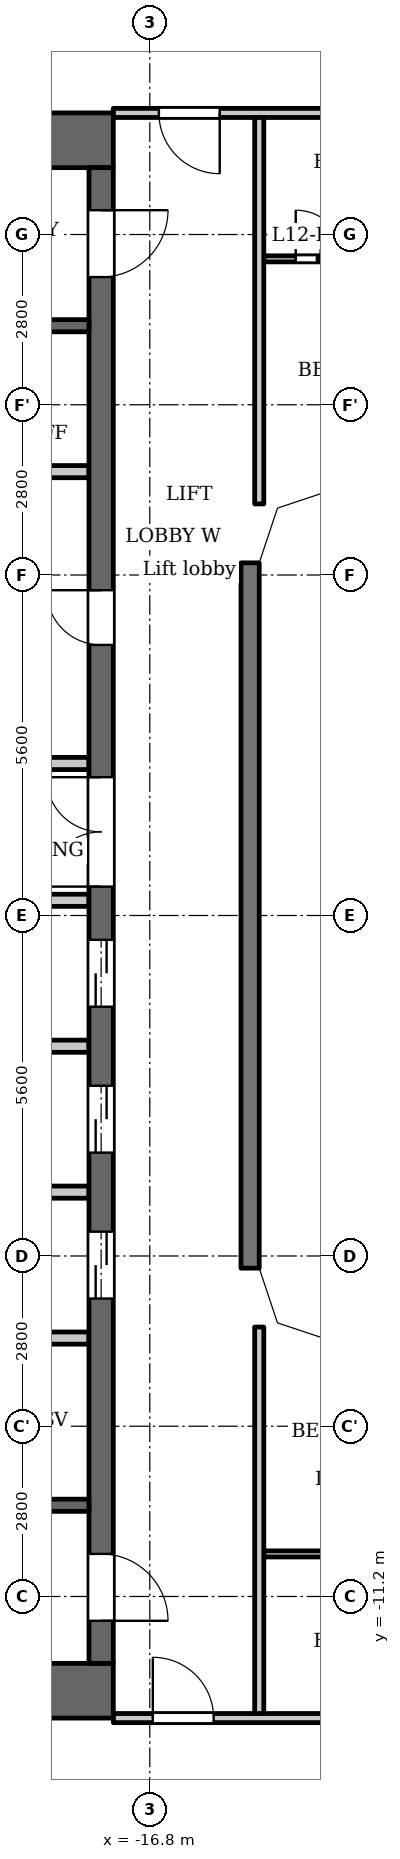
"""IFC4 building model, lengths in metres.
Left out: names, types, materials, properties, quantities, classifications, styles, units other than length and angle.
Written with IfcOpenShell. Run it as: python <this file> out.ifc"""

import sys

from ifc_helpers import new_model, si_unit, direction, frame, frame_2d, origin, place, context, subcontext, project, spatial, polyline, rectangle, outline, extrude, element, fill, save


model = new_model("IFC4")
c1 = context("Model", 3, precision=1e-05, world=origin(), true_north=direction((0.0, 1.0)))
c2 = subcontext(c1, "Body", "Model", "MODEL_VIEW")
j1 = project(units=[si_unit("LENGTHUNIT", "METRE"), si_unit("PLANEANGLEUNIT", "RADIAN")], contexts=[c1])
p1 = place(None, origin())
s1 = spatial("IfcSite", under=j1, at=p1, CompositionType="ELEMENT")
p2 = place(p1, origin())
s2 = spatial("IfcBuilding", under=s1, at=p2, CompositionType="ELEMENT")
p3 = place(p2, frame((0.0, 0.0, 51.5)))
s3 = spatial("IfcBuildingStorey", under=s2, at=p3, CompositionType="ELEMENT", Elevation=51.5)
p4 = place(p3, frame((-15.15, -5.8, 0.0), z_axis=(0.0, 0.0, 1.0), x_axis=(0.0, 1.0, 0.0)))
e1 = element("IfcWall", 1, at=p4, inside=s3, PredefinedType="SOLIDWALL", context=c2, shape_type="SweptSolid", body=[
    extrude(rectangle(XDim=11.6, YDim=0.3, at=frame_2d((5.8, 0.0))), origin(), (0.0, 0.0, 1.0), 3.2),
])
for number, where, z_axis, x_axis in (
    (2, (-17.4, 12.75, 0.0), (0.0, 0.0, 1.0), (-1.0, 0.0, 0.0)),
    (3, (-17.4, -12.75, 0.0), (0.0, 0.0, 1.0), (-1.0, 0.0, 0.0)),
):
    element("IfcWall", number, at=place(p3, frame(where, z_axis=z_axis, x_axis=x_axis)), inside=s3, PredefinedType="SHEAR", context=c2, shape_type="SweptSolid", body=[
        extrude(rectangle(XDim=10.4, YDim=0.9, at=frame_2d((5.2, 0.0))), origin(), (0.0, 0.0, 1.0), 3.2),
    ])
p5 = place(p3, frame((-17.6, -12.3, 0.0), z_axis=(0.0, 0.0, 1.0), x_axis=(0.0, 1.0, 0.0)))
e4 = element("IfcWall", 4, at=p5, inside=s3, PredefinedType="SHEAR", context=c2, shape_type="SweptSolid", body=[
    extrude(rectangle(XDim=24.6, YDim=0.4, at=frame_2d((12.3, 0.0))), origin(), (0.0, 0.0, 1.0), 3.2),
])
p6 = place(p5, frame((6.0, 0.0, 0.0)))
e5 = element("IfcOpeningElement", 5, at=p6, cuts=e4, PredefinedType="OPENING", context=c2, shape_type="SweptSolid", body=[
    extrude(rectangle(XDim=1.1, YDim=2.1, at=frame_2d((0.55, 1.05))), frame((0.0, 0.21, 0.0), z_axis=(0.0, -1.0, 0.0), x_axis=(1.0, 0.0, 0.0)), (0.0, 0.0, 1.0), 0.42),
])
p7 = place(p5, frame((8.4, 0.0, 0.0)))
e6 = element("IfcOpeningElement", 6, at=p7, cuts=e4, PredefinedType="OPENING", context=c2, shape_type="SweptSolid", body=[
    extrude(rectangle(XDim=1.1, YDim=2.1, at=frame_2d((0.55, 1.05))), frame((0.0, 0.21, 0.0), z_axis=(0.0, -1.0, 0.0), x_axis=(1.0, 0.0, 0.0)), (0.0, 0.0, 1.0), 0.42),
])
p8 = place(p5, frame((10.8, 0.0, 0.0)))
e7 = element("IfcOpeningElement", 7, at=p8, cuts=e4, PredefinedType="OPENING", context=c2, shape_type="SweptSolid", body=[
    extrude(rectangle(XDim=1.1, YDim=2.1, at=frame_2d((0.55, 1.05))), frame((0.0, 0.21, 0.0), z_axis=(0.0, -1.0, 0.0), x_axis=(1.0, 0.0, 0.0)), (0.0, 0.0, 1.0), 0.42),
])
p9 = place(p5, frame((16.75, 0.0, 0.0)))
e8 = element("IfcOpeningElement", 8, at=p9, cuts=e4, PredefinedType="OPENING", context=c2, shape_type="SweptSolid", body=[
    extrude(rectangle(XDim=0.9, YDim=2.1, at=frame_2d((0.45, 1.05))), frame((0.0, 0.21, 0.0), z_axis=(0.0, -1.0, 0.0), x_axis=(1.0, 0.0, 0.0)), (0.0, 0.0, 1.0), 0.42),
])
p10 = place(p5, frame((22.8, 0.0, 0.0)))
e9 = element("IfcOpeningElement", 9, at=p10, cuts=e4, PredefinedType="OPENING", context=c2, shape_type="SweptSolid", body=[
    extrude(rectangle(XDim=1.1, YDim=2.1, at=frame_2d((0.55, 1.05))), frame((0.0, 0.21, 0.0), z_axis=(0.0, -1.0, 0.0), x_axis=(1.0, 0.0, 0.0)), (0.0, 0.0, 1.0), 0.42),
])
p11 = place(p5, frame((0.7, 0.0, 0.0)))
e10 = element("IfcOpeningElement", 10, at=p11, cuts=e4, PredefinedType="OPENING", context=c2, shape_type="SweptSolid", body=[
    extrude(rectangle(XDim=1.1, YDim=2.1, at=frame_2d((0.55, 1.05))), frame((0.0, 0.21, 0.0), z_axis=(0.0, -1.0, 0.0), x_axis=(1.0, 0.0, 0.0)), (0.0, 0.0, 1.0), 0.42),
])
p12 = place(p5, frame((12.775, 0.0, 0.0)))
e11 = element("IfcOpeningElement", 11, at=p12, cuts=e4, PredefinedType="OPENING", context=c2, shape_type="SweptSolid", body=[
    extrude(rectangle(XDim=1.8, YDim=2.1, at=frame_2d((0.9, 1.05))), frame((0.0, 0.21, 0.0), z_axis=(0.0, -1.0, 0.0), x_axis=(1.0, 0.0, 0.0)), (0.0, 0.0, 1.0), 0.42),
])
p13 = place(p3, frame((-17.8, -9.7, 0.0), z_axis=(0.0, 0.0, 1.0), x_axis=(-1.0, 0.0, 0.0)))
e12 = element("IfcWall", 12, at=p13, inside=s3, PredefinedType="SHEAR", context=c2, shape_type="SweptSolid", body=[
    extrude(rectangle(XDim=8.3, YDim=0.2, at=frame_2d((4.15, 0.0))), origin(), (0.0, 0.0, 1.0), 3.2),
])
p14 = place(p13, frame((0.85, 0.0, 0.0)))
e13 = element("IfcOpeningElement", 13, at=p14, cuts=e12, PredefinedType="OPENING", context=c2, shape_type="SweptSolid", body=[
    extrude(rectangle(XDim=1.1, YDim=2.1, at=frame_2d((0.55, 1.05))), frame((0.0, 0.11, 0.0), z_axis=(0.0, -1.0, 0.0), x_axis=(1.0, 0.0, 0.0)), (0.0, 0.0, 1.0), 0.22),
])
p15 = place(p13, frame((3.75, 0.0, 0.0)))
e14 = element("IfcOpeningElement", 14, at=p15, cuts=e12, PredefinedType="OPENING", context=c2, shape_type="SweptSolid", body=[
    extrude(rectangle(XDim=1.1, YDim=2.1, at=frame_2d((0.55, 1.05))), frame((0.0, 0.11, 0.0), z_axis=(0.0, -1.0, 0.0), x_axis=(1.0, 0.0, 0.0)), (0.0, 0.0, 1.0), 0.22),
])
for number, where, z_axis, x_axis in (
    (15, (-17.8, -6.95, 0.0), (0.0, 0.0, 1.0), (-1.0, 0.0, 0.0)),
    (16, (-17.8, -4.55, 0.0), (0.0, 0.0, 1.0), (-1.0, 0.0, 0.0)),
    (17, (-17.8, -2.15, 0.0), (0.0, 0.0, 1.0), (-1.0, 0.0, 0.0)),
):
    element("IfcWall", number, at=place(p3, frame(where, z_axis=z_axis, x_axis=x_axis)), inside=s3, PredefinedType="PARTITIONING", context=c2, shape_type="SweptSolid", body=[
        extrude(rectangle(XDim=2.8, YDim=0.2, at=frame_2d((1.4, 0.0))), origin(), (0.0, 0.0, 1.0), 3.2),
    ])
for number, where, z_axis, x_axis in (
    (18, (-17.8, 0.25, 0.0), (0.0, 0.0, 1.0), (-1.0, 0.0, 0.0)),
    (19, (-17.8, 2.5, 0.0), (0.0, 0.0, 1.0), (-1.0, 0.0, 0.0)),
):
    element("IfcWall", number, at=place(p3, frame(where, z_axis=z_axis, x_axis=x_axis)), inside=s3, PredefinedType="PARTITIONING", context=c2, shape_type="SweptSolid", body=[
        extrude(rectangle(XDim=3.0, YDim=0.2, at=frame_2d((1.5, 0.0))), origin(), (0.0, 0.0, 1.0), 3.2),
    ])
p16 = place(p3, frame((-17.8, 7.3, 0.0), z_axis=(0.0, 0.0, 1.0), x_axis=(-1.0, 0.0, 0.0)))
e20 = element("IfcWall", 20, at=p16, inside=s3, PredefinedType="PARTITIONING", context=c2, shape_type="SweptSolid", body=[
    extrude(rectangle(XDim=2.8, YDim=0.2, at=frame_2d((1.4, 0.0))), origin(), (0.0, 0.0, 1.0), 3.2),
])
p17 = place(p3, frame((-17.8, 9.7, 0.0), z_axis=(0.0, 0.0, 1.0), x_axis=(-1.0, 0.0, 0.0)))
e21 = element("IfcWall", 21, at=p17, inside=s3, PredefinedType="SHEAR", context=c2, shape_type="SweptSolid", body=[
    extrude(rectangle(XDim=8.3, YDim=0.2, at=frame_2d((4.15, 0.0))), origin(), (0.0, 0.0, 1.0), 3.2),
])
p18 = place(p17, frame((0.85, 0.0, 0.0)))
e22 = element("IfcOpeningElement", 22, at=p18, cuts=e21, PredefinedType="OPENING", context=c2, shape_type="SweptSolid", body=[
    extrude(rectangle(XDim=1.1, YDim=2.1, at=frame_2d((0.55, 1.05))), frame((0.0, 0.11, 0.0), z_axis=(0.0, -1.0, 0.0), x_axis=(1.0, 0.0, 0.0)), (0.0, 0.0, 1.0), 0.22),
])
p19 = place(p17, frame((3.75, 0.0, 0.0)))
e23 = element("IfcOpeningElement", 23, at=p19, cuts=e21, PredefinedType="OPENING", context=c2, shape_type="SweptSolid", body=[
    extrude(rectangle(XDim=1.1, YDim=2.1, at=frame_2d((0.55, 1.05))), frame((0.0, 0.11, 0.0), z_axis=(0.0, -1.0, 0.0), x_axis=(1.0, 0.0, 0.0)), (0.0, 0.0, 1.0), 0.22),
])
p20 = place(p3, frame((-17.4, -13.2, 0.0), z_axis=(0.0, 0.0, 1.0), x_axis=(1.0, 0.0, 0.0)))
e24 = element("IfcWall", 24, at=p20, inside=s3, PredefinedType="PARTITIONING", context=c2, shape_type="SweptSolid", body=[
    extrude(rectangle(XDim=34.8, YDim=0.15, at=frame_2d((17.4, 0.0))), origin(), (0.0, 0.0, 1.0), 3.2),
])
p21 = place(p20, frame((0.65, 0.0, 0.0)))
e25 = element("IfcOpeningElement", 25, at=p21, cuts=e24, PredefinedType="OPENING", context=c2, shape_type="SweptSolid", body=[
    extrude(rectangle(XDim=1.0, YDim=2.1, at=frame_2d((0.5, 1.05))), frame((0.0, 0.085, 0.0), z_axis=(0.0, -1.0, 0.0), x_axis=(1.0, 0.0, 0.0)), (0.0, 0.0, 1.0), 0.17),
])
p22 = place(p20, frame((33.05, 0.0, 0.0)))
e26 = element("IfcOpeningElement", 26, at=p22, cuts=e24, PredefinedType="OPENING", context=c2, shape_type="SweptSolid", body=[
    extrude(rectangle(XDim=1.0, YDim=2.1, at=frame_2d((0.5, 1.05))), frame((0.0, 0.085, 0.0), z_axis=(0.0, -1.0, 0.0), x_axis=(1.0, 0.0, 0.0)), (0.0, 0.0, 1.0), 0.17),
])
p23 = place(p20, frame((10.15, 0.0, 0.0)))
e27 = element("IfcOpeningElement", 27, at=p23, cuts=e24, PredefinedType="OPENING", context=c2, shape_type="SweptSolid", body=[
    extrude(rectangle(XDim=1.0, YDim=2.1, at=frame_2d((0.5, 1.05))), frame((0.0, 0.085, 0.0), z_axis=(0.0, -1.0, 0.0), x_axis=(1.0, 0.0, 0.0)), (0.0, 0.0, 1.0), 0.17),
])
p24 = place(p20, frame((21.35, 0.0, 0.0)))
e28 = element("IfcOpeningElement", 28, at=p24, cuts=e24, PredefinedType="OPENING", context=c2, shape_type="SweptSolid", body=[
    extrude(rectangle(XDim=1.0, YDim=2.1, at=frame_2d((0.5, 1.05))), frame((0.0, 0.085, 0.0), z_axis=(0.0, -1.0, 0.0), x_axis=(1.0, 0.0, 0.0)), (0.0, 0.0, 1.0), 0.17),
])
p25 = place(p20, frame((30.75, 0.0, 0.0)))
e29 = element("IfcOpeningElement", 29, at=p25, cuts=e24, PredefinedType="OPENING", context=c2, shape_type="SweptSolid", body=[
    extrude(rectangle(XDim=1.0, YDim=2.1, at=frame_2d((0.5, 1.05))), frame((0.0, 0.085, 0.0), z_axis=(0.0, -1.0, 0.0), x_axis=(1.0, 0.0, 0.0)), (0.0, 0.0, 1.0), 0.17),
])
p26 = place(p3, frame((-14.925, -10.5, 0.0), z_axis=(0.0, 0.0, 1.0), x_axis=(1.0, 0.0, 0.0)))
e30 = element("IfcWall", 30, at=p26, inside=s3, PredefinedType="PARTITIONING", context=c2, shape_type="SweptSolid", body=[
    extrude(rectangle(XDim=29.85, YDim=0.1, at=frame_2d((14.925, 0.0))), origin(), (0.0, 0.0, 1.0), 3.2),
])
p27 = place(p26, frame((2.325, 0.0, 0.0)))
e31 = element("IfcOpeningElement", 31, at=p27, cuts=e30, PredefinedType="OPENING", context=c2, shape_type="SweptSolid", body=[
    extrude(rectangle(XDim=0.8, YDim=2.1, at=frame_2d((0.4, 1.05))), frame((0.0, 0.06, 0.0), z_axis=(0.0, -1.0, 0.0), x_axis=(1.0, 0.0, 0.0)), (0.0, 0.0, 1.0), 0.12),
])
p28 = place(p26, frame((7.775, 0.0, 0.0)))
e32 = element("IfcOpeningElement", 32, at=p28, cuts=e30, PredefinedType="OPENING", context=c2, shape_type="SweptSolid", body=[
    extrude(rectangle(XDim=0.9, YDim=2.1, at=frame_2d((0.45, 1.05))), frame((0.0, 0.06, 0.0), z_axis=(0.0, -1.0, 0.0), x_axis=(1.0, 0.0, 0.0)), (0.0, 0.0, 1.0), 0.12),
])
p29 = place(p26, frame((13.475, 0.0, 0.0)))
e33 = element("IfcOpeningElement", 33, at=p29, cuts=e30, PredefinedType="OPENING", context=c2, shape_type="SweptSolid", body=[
    extrude(rectangle(XDim=0.8, YDim=2.1, at=frame_2d((0.4, 1.05))), frame((0.0, 0.06, 0.0), z_axis=(0.0, -1.0, 0.0), x_axis=(1.0, 0.0, 0.0)), (0.0, 0.0, 1.0), 0.12),
])
p30 = place(p26, frame((18.975, 0.0, 0.0)))
e34 = element("IfcOpeningElement", 34, at=p30, cuts=e30, PredefinedType="OPENING", context=c2, shape_type="SweptSolid", body=[
    extrude(rectangle(XDim=0.9, YDim=2.1, at=frame_2d((0.45, 1.05))), frame((0.0, 0.06, 0.0), z_axis=(0.0, -1.0, 0.0), x_axis=(1.0, 0.0, 0.0)), (0.0, 0.0, 1.0), 0.12),
])
p31 = place(p26, frame((24.675, 0.0, 0.0)))
e35 = element("IfcOpeningElement", 35, at=p31, cuts=e30, PredefinedType="OPENING", context=c2, shape_type="SweptSolid", body=[
    extrude(rectangle(XDim=0.8, YDim=2.1, at=frame_2d((0.4, 1.05))), frame((0.0, 0.06, 0.0), z_axis=(0.0, -1.0, 0.0), x_axis=(1.0, 0.0, 0.0)), (0.0, 0.0, 1.0), 0.12),
])
p32 = place(p26, frame((28.375, 0.0, 0.0)))
e36 = element("IfcOpeningElement", 36, at=p32, cuts=e30, PredefinedType="OPENING", context=c2, shape_type="SweptSolid", body=[
    extrude(rectangle(XDim=0.9, YDim=2.1, at=frame_2d((0.45, 1.05))), frame((0.0, 0.06, 0.0), z_axis=(0.0, -1.0, 0.0), x_axis=(1.0, 0.0, 0.0)), (0.0, 0.0, 1.0), 0.12),
])
p33 = place(p3, frame((-14.925, 10.8, 0.0), z_axis=(0.0, 0.0, 1.0), x_axis=(1.0, 0.0, 0.0)))
e37 = element("IfcWall", 37, at=p33, inside=s3, PredefinedType="PARTITIONING", context=c2, shape_type="SweptSolid", body=[
    extrude(rectangle(XDim=29.85, YDim=0.1, at=frame_2d((14.925, 0.0))), origin(), (0.0, 0.0, 1.0), 3.2),
])
p34 = place(p33, frame((0.525, 0.0, 0.0)))
e38 = element("IfcOpeningElement", 38, at=p34, cuts=e37, PredefinedType="OPENING", context=c2, shape_type="SweptSolid", body=[
    extrude(rectangle(XDim=0.8, YDim=2.1, at=frame_2d((0.4, 1.05))), frame((0.0, 0.06, 0.0), z_axis=(0.0, -1.0, 0.0), x_axis=(1.0, 0.0, 0.0)), (0.0, 0.0, 1.0), 0.12),
])
p35 = place(p33, frame((5.375, 0.0, 0.0)))
e39 = element("IfcOpeningElement", 39, at=p35, cuts=e37, PredefinedType="OPENING", context=c2, shape_type="SweptSolid", body=[
    extrude(rectangle(XDim=0.9, YDim=2.1, at=frame_2d((0.45, 1.05))), frame((0.0, 0.06, 0.0), z_axis=(0.0, -1.0, 0.0), x_axis=(1.0, 0.0, 0.0)), (0.0, 0.0, 1.0), 0.12),
])
p36 = place(p33, frame((10.875, 0.0, 0.0)))
e40 = element("IfcOpeningElement", 40, at=p36, cuts=e37, PredefinedType="OPENING", context=c2, shape_type="SweptSolid", body=[
    extrude(rectangle(XDim=0.8, YDim=2.1, at=frame_2d((0.4, 1.05))), frame((0.0, 0.06, 0.0), z_axis=(0.0, -1.0, 0.0), x_axis=(1.0, 0.0, 0.0)), (0.0, 0.0, 1.0), 0.12),
])
p37 = place(p33, frame((12.975, 0.0, 0.0)))
e41 = element("IfcOpeningElement", 41, at=p37, cuts=e37, PredefinedType="OPENING", context=c2, shape_type="SweptSolid", body=[
    extrude(rectangle(XDim=0.9, YDim=2.1, at=frame_2d((0.45, 1.05))), frame((0.0, 0.06, 0.0), z_axis=(0.0, -1.0, 0.0), x_axis=(1.0, 0.0, 0.0)), (0.0, 0.0, 1.0), 0.12),
])
p38 = place(p33, frame((16.575, 0.0, 0.0)))
e42 = element("IfcOpeningElement", 42, at=p38, cuts=e37, PredefinedType="OPENING", context=c2, shape_type="SweptSolid", body=[
    extrude(rectangle(XDim=0.9, YDim=2.1, at=frame_2d((0.45, 1.05))), frame((0.0, 0.06, 0.0), z_axis=(0.0, -1.0, 0.0), x_axis=(1.0, 0.0, 0.0)), (0.0, 0.0, 1.0), 0.12),
])
p39 = place(p33, frame((18.825, 0.0, 0.0)))
e43 = element("IfcOpeningElement", 43, at=p39, cuts=e37, PredefinedType="OPENING", context=c2, shape_type="SweptSolid", body=[
    extrude(rectangle(XDim=0.9, YDim=2.1, at=frame_2d((0.45, 1.05))), frame((0.0, 0.06, 0.0), z_axis=(0.0, -1.0, 0.0), x_axis=(1.0, 0.0, 0.0)), (0.0, 0.0, 1.0), 0.12),
])
p40 = place(p33, frame((21.175, 0.0, 0.0)))
e44 = element("IfcOpeningElement", 44, at=p40, cuts=e37, PredefinedType="OPENING", context=c2, shape_type="SweptSolid", body=[
    extrude(rectangle(XDim=0.8, YDim=2.1, at=frame_2d((0.4, 1.05))), frame((0.0, 0.06, 0.0), z_axis=(0.0, -1.0, 0.0), x_axis=(1.0, 0.0, 0.0)), (0.0, 0.0, 1.0), 0.12),
])
p41 = place(p33, frame((27.775, 0.0, 0.0)))
e45 = element("IfcOpeningElement", 45, at=p41, cuts=e37, PredefinedType="OPENING", context=c2, shape_type="SweptSolid", body=[
    extrude(rectangle(XDim=0.9, YDim=2.1, at=frame_2d((0.45, 1.05))), frame((0.0, 0.06, 0.0), z_axis=(0.0, -1.0, 0.0), x_axis=(1.0, 0.0, 0.0)), (0.0, 0.0, 1.0), 0.12),
])
p42 = place(p3, frame((-17.4, 13.2, 0.0), z_axis=(0.0, 0.0, 1.0), x_axis=(1.0, 0.0, 0.0)))
e46 = element("IfcWall", 46, at=p42, inside=s3, PredefinedType="PARTITIONING", context=c2, shape_type="SweptSolid", body=[
    extrude(rectangle(XDim=34.8, YDim=0.15, at=frame_2d((17.4, 0.0))), origin(), (0.0, 0.0, 1.0), 3.2),
])
p43 = place(p42, frame((0.75, 0.0, 0.0)))
e47 = element("IfcOpeningElement", 47, at=p43, cuts=e46, PredefinedType="OPENING", context=c2, shape_type="SweptSolid", body=[
    extrude(rectangle(XDim=1.0, YDim=2.1, at=frame_2d((0.5, 1.05))), frame((0.0, 0.085, 0.0), z_axis=(0.0, -1.0, 0.0), x_axis=(1.0, 0.0, 0.0)), (0.0, 0.0, 1.0), 0.17),
])
p44 = place(p42, frame((33.15, 0.0, 0.0)))
e48 = element("IfcOpeningElement", 48, at=p44, cuts=e46, PredefinedType="OPENING", context=c2, shape_type="SweptSolid", body=[
    extrude(rectangle(XDim=1.0, YDim=2.1, at=frame_2d((0.5, 1.05))), frame((0.0, 0.085, 0.0), z_axis=(0.0, -1.0, 0.0), x_axis=(1.0, 0.0, 0.0)), (0.0, 0.0, 1.0), 0.17),
])
p45 = place(p42, frame((6.85, 0.0, 0.0)))
e49 = element("IfcOpeningElement", 49, at=p45, cuts=e46, PredefinedType="OPENING", context=c2, shape_type="SweptSolid", body=[
    extrude(rectangle(XDim=1.0, YDim=2.1, at=frame_2d((0.5, 1.05))), frame((0.0, 0.085, 0.0), z_axis=(0.0, -1.0, 0.0), x_axis=(1.0, 0.0, 0.0)), (0.0, 0.0, 1.0), 0.17),
])
p46 = place(p42, frame((18.05, 0.0, 0.0)))
e50 = element("IfcOpeningElement", 50, at=p46, cuts=e46, PredefinedType="OPENING", context=c2, shape_type="SweptSolid", body=[
    extrude(rectangle(XDim=1.0, YDim=2.1, at=frame_2d((0.5, 1.05))), frame((0.0, 0.085, 0.0), z_axis=(0.0, -1.0, 0.0), x_axis=(1.0, 0.0, 0.0)), (0.0, 0.0, 1.0), 0.17),
])
p47 = place(p42, frame((29.25, 0.0, 0.0)))
e51 = element("IfcOpeningElement", 51, at=p47, cuts=e46, PredefinedType="OPENING", context=c2, shape_type="SweptSolid", body=[
    extrude(rectangle(XDim=1.0, YDim=2.1, at=frame_2d((0.5, 1.05))), frame((0.0, 0.085, 0.0), z_axis=(0.0, -1.0, 0.0), x_axis=(1.0, 0.0, 0.0)), (0.0, 0.0, 1.0), 0.17),
])
for number, where, z_axis, x_axis in (
    (52, (-15.0, -13.125, 0.0), (0.0, 0.0, 1.0), (0.0, 1.0, 0.0)),
    (53, (-15.0, 6.769, 0.0), (0.0, 0.0, 1.0), (0.0, 1.0, 0.0)),
):
    element("IfcWall", number, at=place(p3, frame(where, z_axis=z_axis, x_axis=x_axis)), inside=s3, PredefinedType="PARTITIONING", context=c2, shape_type="SweptSolid", body=[
        extrude(rectangle(XDim=6.356, YDim=0.15, at=frame_2d((3.178, 0.0))), origin(), (0.0, 0.0, 1.0), 3.2),
    ])
p48 = place(p3, origin())
e54 = element("IfcWall", 54, at=p48, inside=s3, PredefinedType="SOLIDWALL", context=c2, shape_type="SweptSolid", body=[
    extrude(outline(polyline([(-13.849, 7.3), (-14.937, 6.937), (-15.3, 5.849), (-15.3, 5.8), (-15.0, 5.8), (-14.7, 6.7), (-13.8, 7.0), (-13.8, 7.3), (-13.849, 7.3)])), origin(), (0.0, 0.0, 1.0), 3.2),
])
e55 = element("IfcWall", 55, at=p48, inside=s3, PredefinedType="SOLIDWALL", context=c2, shape_type="SweptSolid", body=[
    extrude(outline(polyline([(-14.937, -6.937), (-13.849, -7.3), (-13.8, -7.3), (-13.8, -7.0), (-14.7, -6.7), (-15.0, -5.8), (-15.3, -5.8), (-15.3, -5.849), (-14.937, -6.937)])), origin(), (0.0, 0.0, 1.0), 3.2),
])
p49 = place(p6, origin())
e56 = element("IfcDoor", 56, at=p49, inside=s3, OperationType="DOUBLE_DOOR_SLIDING", PredefinedType="DOOR", context=c2, shape_type="SweptSolid", body=[
    extrude(rectangle(XDim=1.1, YDim=2.1, at=frame_2d((0.55, 1.05))), frame((0.0, 0.025, 0.0), z_axis=(0.0, -1.0, 0.0), x_axis=(1.0, 0.0, 0.0)), (0.0, 0.0, 1.0), 0.05),
])
fill(e5, e56)
p50 = place(p7, origin())
e57 = element("IfcDoor", 57, at=p50, inside=s3, OperationType="DOUBLE_DOOR_SLIDING", PredefinedType="DOOR", context=c2, shape_type="SweptSolid", body=[
    extrude(rectangle(XDim=1.1, YDim=2.1, at=frame_2d((0.55, 1.05))), frame((0.0, 0.025, 0.0), z_axis=(0.0, -1.0, 0.0), x_axis=(1.0, 0.0, 0.0)), (0.0, 0.0, 1.0), 0.05),
])
fill(e6, e57)
p51 = place(p8, origin())
e58 = element("IfcDoor", 58, at=p51, inside=s3, OperationType="DOUBLE_DOOR_SLIDING", PredefinedType="DOOR", context=c2, shape_type="SweptSolid", body=[
    extrude(rectangle(XDim=1.1, YDim=2.1, at=frame_2d((0.55, 1.05))), frame((0.0, 0.025, 0.0), z_axis=(0.0, -1.0, 0.0), x_axis=(1.0, 0.0, 0.0)), (0.0, 0.0, 1.0), 0.05),
])
fill(e7, e58)
p52 = place(p9, origin())
e59 = element("IfcDoor", 59, at=p52, inside=s3, OperationType="SINGLE_SWING_LEFT", PredefinedType="DOOR", context=c2, shape_type="SweptSolid", body=[
    extrude(rectangle(XDim=0.9, YDim=2.1, at=frame_2d((0.45, 1.05))), frame((0.0, 0.025, 0.0), z_axis=(0.0, -1.0, 0.0), x_axis=(1.0, 0.0, 0.0)), (0.0, 0.0, 1.0), 0.05),
])
fill(e8, e59)
p53 = place(p10, origin())
e60 = element("IfcDoor", 60, at=p53, inside=s3, OperationType="SINGLE_SWING_RIGHT", PredefinedType="DOOR", context=c2, shape_type="SweptSolid", body=[
    extrude(rectangle(XDim=1.1, YDim=2.1, at=frame_2d((0.55, 1.05))), frame((0.0, 0.025, 0.0), z_axis=(0.0, -1.0, 0.0), x_axis=(1.0, 0.0, 0.0)), (0.0, 0.0, 1.0), 0.05),
])
fill(e9, e60)
p54 = place(p11, origin())
e61 = element("IfcDoor", 61, at=p54, inside=s3, OperationType="SINGLE_SWING_LEFT", PredefinedType="DOOR", context=c2, shape_type="SweptSolid", body=[
    extrude(rectangle(XDim=1.1, YDim=2.1, at=frame_2d((0.55, 1.05))), frame((0.0, 0.025, 0.0), z_axis=(0.0, -1.0, 0.0), x_axis=(1.0, 0.0, 0.0)), (0.0, 0.0, 1.0), 0.05),
])
fill(e10, e61)
p55 = place(p12, origin())
e62 = element("IfcDoor", 62, at=p55, inside=s3, OperationType="DOUBLE_DOOR_SINGLE_SWING", PredefinedType="DOOR", context=c2, shape_type="SweptSolid", body=[
    extrude(rectangle(XDim=1.8, YDim=2.1, at=frame_2d((0.9, 1.05))), frame((0.0, 0.025, 0.0), z_axis=(0.0, -1.0, 0.0), x_axis=(1.0, 0.0, 0.0)), (0.0, 0.0, 1.0), 0.05),
])
fill(e11, e62)
p56 = place(p43, origin())
e63 = element("IfcDoor", 63, at=p56, inside=s3, OperationType="SINGLE_SWING_RIGHT", PredefinedType="DOOR", context=c2, shape_type="SweptSolid", body=[
    extrude(rectangle(XDim=1.0, YDim=2.1, at=frame_2d((0.5, 1.05))), frame((0.0, 0.025, 0.0), z_axis=(0.0, -1.0, 0.0), x_axis=(1.0, 0.0, 0.0)), (0.0, 0.0, 1.0), 0.05),
])
fill(e47, e63)
p57 = place(p21, origin())
e64 = element("IfcDoor", 64, at=p57, inside=s3, OperationType="SINGLE_SWING_RIGHT", PredefinedType="DOOR", context=c2, shape_type="SweptSolid", body=[
    extrude(rectangle(XDim=1.0, YDim=2.1, at=frame_2d((0.5, 1.05))), frame((0.0, 0.025, 0.0), z_axis=(0.0, -1.0, 0.0), x_axis=(1.0, 0.0, 0.0)), (0.0, 0.0, 1.0), 0.05),
])
fill(e25, e64)
p58 = place(p34, origin())
e65 = element("IfcDoor", 65, at=p58, inside=s3, OperationType="SINGLE_SWING_RIGHT", PredefinedType="DOOR", context=c2, shape_type="SweptSolid", body=[
    extrude(rectangle(XDim=0.8, YDim=2.1, at=frame_2d((0.4, 1.05))), frame((0.0, 0.025, 0.0), z_axis=(0.0, -1.0, 0.0), x_axis=(1.0, 0.0, 0.0)), (0.0, 0.0, 1.0), 0.05),
])
fill(e38, e65)
save(model, sys.argv[1])
